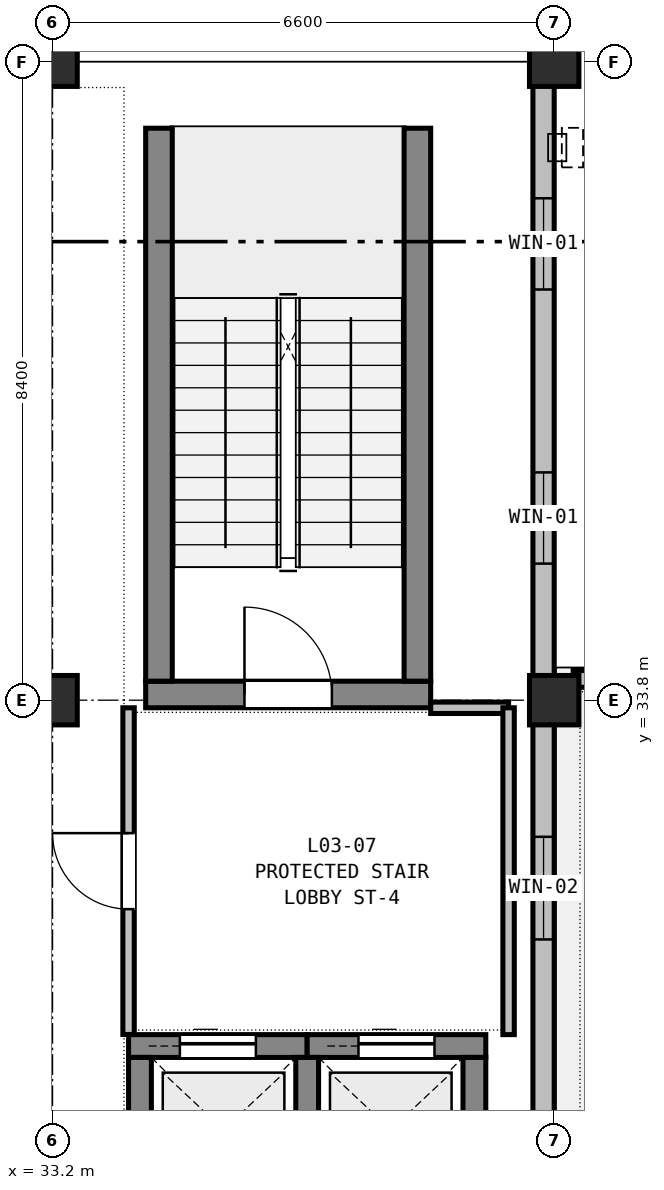
"""IFC4 building model, lengths in metres.
Left out: names, types, materials, properties, quantities, classifications, styles, units other than length and angle.
Written with IfcOpenShell. Run it as: python <this file> out.ifc"""

import sys

from ifc_helpers import new_model, si_unit, direction, frame, frame_2d, origin, origin_2d, place, context, subcontext, project, spatial, rectangle, extrude, element, fill, save


model = new_model("IFC4")
c1 = context("Model", 3, precision=1e-05, world=origin(), true_north=direction((0.0, 1.0)))
c2 = subcontext(c1, "Body", "Model", "MODEL_VIEW")
j1 = project(units=[si_unit("LENGTHUNIT", "METRE"), si_unit("PLANEANGLEUNIT", "RADIAN")], contexts=[c1])
p1 = place(None, origin())
s1 = spatial("IfcSite", under=j1, at=p1, CompositionType="ELEMENT")
p2 = place(p1, origin())
s2 = spatial("IfcBuilding", under=s1, at=p2, CompositionType="ELEMENT")
p3 = place(p2, frame((0.0, 0.0, 15.0)))
s3 = spatial("IfcBuildingStorey", under=s2, at=p3, CompositionType="ELEMENT", Elevation=15.0)
for number, where, z_axis, x_axis in (
    (1, (33.2, 33.8, 0.0), (0.0, 0.0, 1.0), (1.0, 0.0, 0.0)),
    (2, (33.2, 42.2, 0.0), (0.0, 0.0, 1.0), (1.0, 0.0, 0.0)),
    (3, (39.8, 33.8, 0.0), (0.0, 0.0, 1.0), (1.0, 0.0, 0.0)),
    (4, (39.8, 42.2, 0.0), (0.0, 0.0, 1.0), (1.0, 0.0, 0.0)),
):
    element("IfcColumn", number, at=place(p3, frame(where, z_axis=z_axis, x_axis=x_axis)), inside=s3, PredefinedType="COLUMN", context=c2, shape_type="SweptSolid", body=[
        extrude(rectangle(XDim=0.65, YDim=0.65, at=origin_2d()), origin(), (0.0, 0.0, 1.0), 4.5),
    ])
p4 = place(p3, frame((34.425, 33.875, 0.0), z_axis=(0.0, 0.0, 1.0), x_axis=(1.0, 0.0, 0.0)))
e5 = element("IfcWall", 5, at=p4, inside=s3, PredefinedType="SHEAR", context=c2, shape_type="SweptSolid", body=[
    extrude(rectangle(XDim=3.75, YDim=0.35, at=frame_2d((1.875, 0.0))), origin(), (0.0, 0.0, 1.0), 4.5),
])
p5 = place(p4, frame((1.3, 0.0, 0.0)))
e6 = element("IfcOpeningElement", 6, at=p5, cuts=e5, PredefinedType="OPENING", context=c2, shape_type="SweptSolid", body=[
    extrude(rectangle(XDim=1.15, YDim=2.15, at=frame_2d((0.575, 1.075))), frame((0.0, 0.185, 0.0), z_axis=(0.0, -1.0, 0.0), x_axis=(1.0, 0.0, 0.0)), (0.0, 0.0, 1.0), 0.37),
])
p6 = place(p3, frame((34.425, 41.5, 0.0), z_axis=(0.0, 0.0, 1.0), x_axis=(1.0, 0.0, 0.0)))
e7 = element("IfcWall", 7, at=p6, inside=s3, PredefinedType="SHEAR", context=c2, shape_type="SweptSolid", body=[
    extrude(rectangle(XDim=3.75, YDim=0.35, at=frame_2d((1.875, 0.0))), origin(), (0.0, 0.0, 1.0), 4.5),
])
for number, where, z_axis, x_axis in (
    (8, (34.6, 34.05, 0.0), (0.0, 0.0, 1.0), (0.0, 1.0, 0.0)),
    (9, (38.0, 34.05, 0.0), (0.0, 0.0, 1.0), (0.0, 1.0, 0.0)),
):
    element("IfcWall", number, at=place(p3, frame(where, z_axis=z_axis, x_axis=x_axis)), inside=s3, PredefinedType="SHEAR", context=c2, shape_type="SweptSolid", body=[
        extrude(rectangle(XDim=7.275, YDim=0.35, at=frame_2d((3.637, 0.0))), origin(), (0.0, 0.0, 1.0), 4.5),
    ])
p7 = place(p3, frame((34.2, 29.25, 0.0), z_axis=(0.0, 0.0, 1.0), x_axis=(1.0, 0.0, 0.0)))
e10 = element("IfcWall", 10, at=p7, inside=s3, PredefinedType="SHEAR", context=c2, shape_type="SweptSolid", body=[
    extrude(rectangle(XDim=2.35, YDim=0.3, at=frame_2d((1.175, 0.0))), origin(), (0.0, 0.0, 1.0), 4.5),
])
p8 = place(p7, frame((0.675, 0.0, 0.0)))
e11 = element("IfcOpeningElement", 11, at=p8, cuts=e10, PredefinedType="OPENING", context=c2, shape_type="SweptSolid", body=[
    extrude(rectangle(XDim=1.0, YDim=2.1, at=frame_2d((0.5, 1.05))), frame((0.0, 0.16, 0.0), z_axis=(0.0, -1.0, 0.0), x_axis=(1.0, 0.0, 0.0)), (0.0, 0.0, 1.0), 0.32),
])
p9 = place(p3, frame((36.55, 29.25, 0.0), z_axis=(0.0, 0.0, 1.0), x_axis=(1.0, 0.0, 0.0)))
e12 = element("IfcWall", 12, at=p9, inside=s3, PredefinedType="SHEAR", context=c2, shape_type="SweptSolid", body=[
    extrude(rectangle(XDim=2.35, YDim=0.3, at=frame_2d((1.175, 0.0))), origin(), (0.0, 0.0, 1.0), 4.5),
])
p10 = place(p9, frame((0.675, 0.0, 0.0)))
e13 = element("IfcOpeningElement", 13, at=p10, cuts=e12, PredefinedType="OPENING", context=c2, shape_type="SweptSolid", body=[
    extrude(rectangle(XDim=1.0, YDim=2.1, at=frame_2d((0.5, 1.05))), frame((0.0, 0.16, 0.0), z_axis=(0.0, -1.0, 0.0), x_axis=(1.0, 0.0, 0.0)), (0.0, 0.0, 1.0), 0.32),
])
for number, where, z_axis, x_axis in (
    (14, (34.35, 27.2, 0.0), (0.0, 0.0, 1.0), (0.0, 1.0, 0.0)),
    (15, (36.55, 27.2, 0.0), (0.0, 0.0, 1.0), (0.0, 1.0, 0.0)),
    (16, (38.75, 27.2, 0.0), (0.0, 0.0, 1.0), (0.0, 1.0, 0.0)),
):
    element("IfcWall", number, at=place(p3, frame(where, z_axis=z_axis, x_axis=x_axis)), inside=s3, PredefinedType="SHEAR", context=c2, shape_type="SweptSolid", body=[
        extrude(rectangle(XDim=1.9, YDim=0.3, at=frame_2d((0.95, 0.0))), origin(), (0.0, 0.0, 1.0), 4.5),
    ])
for number, where, z_axis, x_axis in (
    (17, (33.2, 42.06, 0.0), (0.0, 0.0, 1.0), (1.0, 0.0, 0.0)),
    (18, (39.28, 42.06, 0.0), (0.0, 0.0, 1.0), (1.0, 0.0, 0.0)),
):
    element("IfcWall", number, at=place(p3, frame(where, z_axis=z_axis, x_axis=x_axis)), inside=s3, PredefinedType="STANDARD", context=c2, shape_type="SweptSolid", body=[
        extrude(rectangle(XDim=0.52, YDim=0.28, at=frame_2d((0.26, 0.0))), origin(), (0.0, 0.0, 1.0), 3.735),
    ])
p11 = place(p3, frame((39.66, 41.92, 0.0), z_axis=(0.0, 0.0, 1.0), x_axis=(0.0, -1.0, 0.0)))
e19 = element("IfcWall", 19, at=p11, inside=s3, PredefinedType="STANDARD", context=c2, shape_type="SweptSolid", body=[
    extrude(rectangle(XDim=7.84, YDim=0.28, at=frame_2d((3.92, 0.0))), origin(), (0.0, 0.0, 1.0), 3.735),
])
p12 = place(p11, frame((1.517, 0.0, 0.9)))
e20 = element("IfcOpeningElement", 20, at=p12, cuts=e19, PredefinedType="OPENING", context=c2, shape_type="SweptSolid", body=[
    extrude(rectangle(XDim=1.2, YDim=2.1, at=frame_2d((0.6, 1.05))), frame((0.0, 0.15, 0.0), z_axis=(0.0, -1.0, 0.0), x_axis=(1.0, 0.0, 0.0)), (0.0, 0.0, 1.0), 0.3),
])
p13 = place(p11, frame((5.123, 0.0, 0.9)))
e21 = element("IfcOpeningElement", 21, at=p13, cuts=e19, PredefinedType="OPENING", context=c2, shape_type="SweptSolid", body=[
    extrude(rectangle(XDim=1.2, YDim=2.1, at=frame_2d((0.6, 1.05))), frame((0.0, 0.15, 0.0), z_axis=(0.0, -1.0, 0.0), x_axis=(1.0, 0.0, 0.0)), (0.0, 0.0, 1.0), 0.3),
])
p14 = place(p3, frame((39.66, 33.52, 0.0), z_axis=(0.0, 0.0, 1.0), x_axis=(0.0, -1.0, 0.0)))
e22 = element("IfcWall", 22, at=p14, inside=s3, PredefinedType="STANDARD", context=c2, shape_type="SweptSolid", body=[
    extrude(rectangle(XDim=8.12, YDim=0.28, at=frame_2d((4.06, 0.0))), origin(), (0.0, 0.0, 1.0), 3.735),
])
p15 = place(p14, frame((1.517, 0.0, 0.9)))
e23 = element("IfcOpeningElement", 23, at=p15, cuts=e22, PredefinedType="OPENING", context=c2, shape_type="SweptSolid", body=[
    extrude(rectangle(XDim=1.35, YDim=2.1, at=frame_2d((0.675, 1.05))), frame((0.0, 0.15, 0.0), z_axis=(0.0, -1.0, 0.0), x_axis=(1.0, 0.0, 0.0)), (0.0, 0.0, 1.0), 0.3),
])
p16 = place(p14, frame((5.253, 0.0, 0.9)))
e24 = element("IfcOpeningElement", 24, at=p16, cuts=e22, PredefinedType="OPENING", context=c2, shape_type="SweptSolid", body=[
    extrude(rectangle(XDim=1.35, YDim=2.1, at=frame_2d((0.675, 1.05))), frame((0.0, 0.15, 0.0), z_axis=(0.0, -1.0, 0.0), x_axis=(1.0, 0.0, 0.0)), (0.0, 0.0, 1.0), 0.3),
])
p17 = place(p3, frame((40.05, 34.08, 0.0), z_axis=(0.0, 0.0, 1.0), x_axis=(1.0, 0.0, 0.0)))
e25 = element("IfcWall", 25, at=p17, inside=s3, PredefinedType="PARAPET", context=c2, shape_type="SweptSolid", body=[
    extrude(rectangle(XDim=6.63, YDim=0.22, at=frame_2d((3.315, 0.0))), origin(), (0.0, 0.0, 1.0), 0.68),
])
p18 = place(p3, frame((38.175, 33.7, 0.0), z_axis=(0.0, 0.0, 1.0), x_axis=(1.0, 0.0, 0.0)))
e26 = element("IfcWall", 26, at=p18, inside=s3, PredefinedType="PARTITIONING", context=c2, shape_type="SweptSolid", body=[
    extrude(rectangle(XDim=1.025, YDim=0.15, at=frame_2d((0.512, 0.0))), origin(), (0.0, 0.0, 1.0), 3.835),
])
p19 = place(p3, frame((39.2, 33.7, 0.0), z_axis=(0.0, 0.0, 1.0), x_axis=(0.0, -1.0, 0.0)))
e27 = element("IfcWall", 27, at=p19, inside=s3, PredefinedType="PARTITIONING", context=c2, shape_type="SweptSolid", body=[
    extrude(rectangle(XDim=4.3, YDim=0.15, at=frame_2d((2.15, 0.0))), origin(), (0.0, 0.0, 1.0), 3.835),
])
p20 = place(p3, frame((34.2, 29.402, 0.0), z_axis=(0.0, 0.0, 1.0), x_axis=(0.0, 1.0, 0.0)))
e28 = element("IfcWall", 28, at=p20, inside=s3, PredefinedType="PARTITIONING", context=c2, shape_type="SweptSolid", body=[
    extrude(rectangle(XDim=4.298, YDim=0.15, at=frame_2d((2.149, 0.0))), origin(), (0.0, 0.0, 1.0), 3.835),
])
p21 = place(p20, frame((1.649, 0.0, 0.0)))
e29 = element("IfcOpeningElement", 29, at=p21, cuts=e28, PredefinedType="OPENING", context=c2, shape_type="SweptSolid", body=[
    extrude(rectangle(XDim=1.0, YDim=2.1, at=frame_2d((0.5, 1.05))), frame((0.0, 0.085, 0.0), z_axis=(0.0, -1.0, 0.0), x_axis=(1.0, 0.0, 0.0)), (0.0, 0.0, 1.0), 0.17),
])
p22 = place(p12, origin())
e30 = element("IfcWindow", 30, at=p22, inside=s3, PartitioningType="SINGLE_PANEL", PredefinedType="WINDOW", context=c2, shape_type="SweptSolid", body=[
    extrude(rectangle(XDim=1.2, YDim=2.1, at=frame_2d((0.6, 1.05))), frame((0.0, 0.03, 0.0), z_axis=(0.0, -1.0, 0.0), x_axis=(1.0, 0.0, 0.0)), (0.0, 0.0, 1.0), 0.06),
])
fill(e20, e30)
p23 = place(p13, origin())
e31 = element("IfcWindow", 31, at=p23, inside=s3, PartitioningType="SINGLE_PANEL", PredefinedType="WINDOW", context=c2, shape_type="SweptSolid", body=[
    extrude(rectangle(XDim=1.2, YDim=2.1, at=frame_2d((0.6, 1.05))), frame((0.0, 0.03, 0.0), z_axis=(0.0, -1.0, 0.0), x_axis=(1.0, 0.0, 0.0)), (0.0, 0.0, 1.0), 0.06),
])
fill(e21, e31)
p24 = place(p15, origin())
e32 = element("IfcWindow", 32, at=p24, inside=s3, PartitioningType="SINGLE_PANEL", PredefinedType="WINDOW", context=c2, shape_type="SweptSolid", body=[
    extrude(rectangle(XDim=1.35, YDim=2.1, at=frame_2d((0.675, 1.05))), frame((0.0, 0.03, 0.0), z_axis=(0.0, -1.0, 0.0), x_axis=(1.0, 0.0, 0.0)), (0.0, 0.0, 1.0), 0.06),
])
fill(e23, e32)
p25 = place(p5, origin())
e33 = element("IfcDoor", 33, at=p25, inside=s3, OperationType="SINGLE_SWING_LEFT", PredefinedType="DOOR", context=c2, shape_type="SweptSolid", body=[
    extrude(rectangle(XDim=1.15, YDim=2.15, at=frame_2d((0.575, 1.075))), frame((0.0, 0.025, 0.0), z_axis=(0.0, -1.0, 0.0), x_axis=(1.0, 0.0, 0.0)), (0.0, 0.0, 1.0), 0.05),
])
fill(e6, e33)
p26 = place(p8, origin())
e34 = element("IfcDoor", 34, at=p26, inside=s3, OperationType="SLIDING_TO_LEFT", PredefinedType="DOOR", context=c2, shape_type="SweptSolid", body=[
    extrude(rectangle(XDim=1.0, YDim=2.1, at=frame_2d((0.5, 1.05))), frame((0.0, 0.025, 0.0), z_axis=(0.0, -1.0, 0.0), x_axis=(1.0, 0.0, 0.0)), (0.0, 0.0, 1.0), 0.05),
])
fill(e11, e34)
p27 = place(p10, origin())
e35 = element("IfcDoor", 35, at=p27, inside=s3, OperationType="SLIDING_TO_LEFT", PredefinedType="DOOR", context=c2, shape_type="SweptSolid", body=[
    extrude(rectangle(XDim=1.0, YDim=2.1, at=frame_2d((0.5, 1.05))), frame((0.0, 0.025, 0.0), z_axis=(0.0, -1.0, 0.0), x_axis=(1.0, 0.0, 0.0)), (0.0, 0.0, 1.0), 0.05),
])
fill(e13, e35)
p28 = place(p21, origin())
e36 = element("IfcDoor", 36, at=p28, inside=s3, OperationType="SINGLE_SWING_RIGHT", PredefinedType="DOOR", context=c2, shape_type="SweptSolid", body=[
    extrude(rectangle(XDim=1.0, YDim=2.1, at=frame_2d((0.5, 1.05))), frame((0.0, 0.025, 0.0), z_axis=(0.0, -1.0, 0.0), x_axis=(1.0, 0.0, 0.0)), (0.0, 0.0, 1.0), 0.05),
])
fill(e29, e36)
save(model, sys.argv[1])
